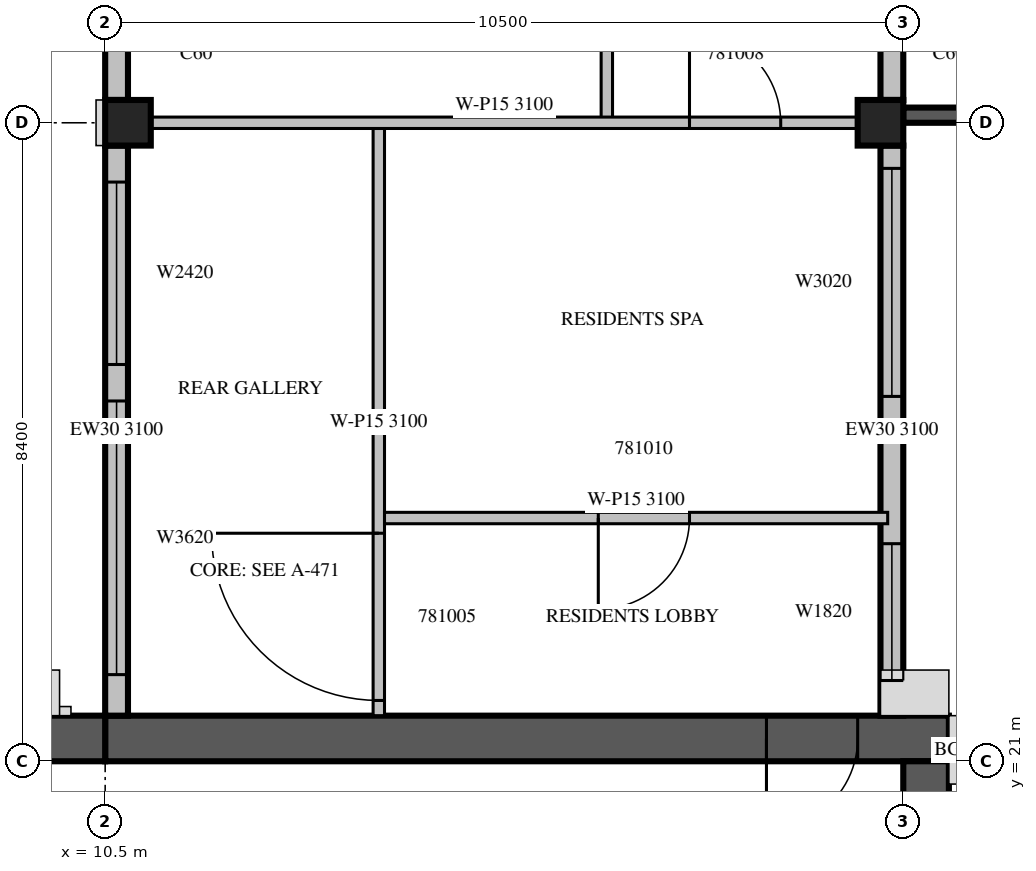
"""IFC4 building model, lengths in metres.
Left out: names, types, materials, properties, quantities, classifications, styles, units other than length and angle.
Written with IfcOpenShell. Run it as: python <this file> out.ifc"""

import sys

from ifc_helpers import new_model, si_unit, direction, frame, frame_2d, origin, origin_2d, place, context, subcontext, project, spatial, rectangle, extrude, source, transform, mapped, element, fill, save


model = new_model("IFC4")
c1 = context("Model", 3, precision=1e-05, world=origin(), true_north=direction((0.0, 1.0)))
c2 = subcontext(c1, "Body", "Model", "MODEL_VIEW")
j1 = project(units=[si_unit("LENGTHUNIT", "METRE"), si_unit("PLANEANGLEUNIT", "RADIAN")], contexts=[c1])
p1 = place(None, origin())
s1 = spatial("IfcSite", under=j1, at=p1, CompositionType="ELEMENT")
p2 = place(p1, origin())
s2 = spatial("IfcBuilding", under=s1, at=p2, CompositionType="ELEMENT")
p3 = place(p2, frame((0.0, 0.0, 344.0)))
s3 = spatial("IfcBuildingStorey", under=s2, at=p3, CompositionType="ELEMENT", Elevation=344.0)
m1 = source(origin(), c2, "Body", "SweptSolid", [
    extrude(rectangle(XDim=0.6, YDim=0.6, at=origin_2d()), origin(), (0.0, 0.0, 1.0), 3.5),
])
for number, where, z_axis, x_axis in (
    (1, (10.8, 29.4, 0.0), (0.0, 0.0, 1.0), (1.0, 0.0, 0.0)),
    (2, (20.7, 29.4, 0.0), (0.0, 0.0, 1.0), (1.0, 0.0, 0.0)),
):
    element("IfcColumn", number, at=place(p3, frame(where, z_axis=z_axis, x_axis=x_axis)), inside=s3, PredefinedType="COLUMN", context=c2, shape_type="MappedRepresentation", body=[
        mapped(m1, transform((0.0, 0.0, 0.0), scale=1.0)),
    ])
m2 = source(origin(), c2, "Body", "SweptSolid", [
    extrude(rectangle(XDim=11.1, YDim=0.6, at=frame_2d((5.55, 0.0))), origin(), (0.0, 0.0, 1.0), 3.5),
])
p4 = place(p3, frame((10.5, 21.3, 0.0), z_axis=(0.0, 0.0, 1.0), x_axis=(1.0, 0.0, 0.0)))
e3 = element("IfcWall", 3, at=p4, inside=s3, PredefinedType="SHEAR", context=c2, shape_type="MappedRepresentation", body=[
    mapped(m2, transform((0.0, 0.0, 0.0), scale=1.0)),
])
m3 = source(origin(), c2, "Body", "SweptSolid", [
    extrude(rectangle(XDim=1.2, YDim=2.1, at=frame_2d((0.6, 1.05))), frame((0.0, 0.31, 0.0), z_axis=(0.0, -1.0, 0.0), x_axis=(1.0, 0.0, 0.0)), (0.0, 0.0, 1.0), 0.62),
])
p5 = place(p4, frame((8.7, 0.0, 0.0)))
e4 = element("IfcOpeningElement", 4, at=p5, cuts=e3, PredefinedType="OPENING", context=c2, shape_type="MappedRepresentation", body=[
    mapped(m3, transform((0.0, 0.0, 0.0), scale=1.0)),
])
m4 = source(origin(), c2, "Body", "SweptSolid", [
    extrude(rectangle(XDim=16.8, YDim=0.6, at=frame_2d((8.4, 0.0))), origin(), (0.0, 0.0, 1.0), 3.5),
])
p6 = place(p3, frame((21.3, 4.2, 0.0), z_axis=(0.0, 0.0, 1.0), x_axis=(0.0, 1.0, 0.0)))
e5 = element("IfcWall", 5, at=p6, inside=s3, PredefinedType="SHEAR", context=c2, shape_type="MappedRepresentation", body=[
    mapped(m4, transform((0.0, 0.0, 0.0), scale=1.0)),
])
m5 = source(origin(), c2, "Body", "SweptSolid", [
    extrude(rectangle(XDim=1.2, YDim=2.4, at=frame_2d((0.6, 1.2))), frame((0.0, 0.31, 0.0), z_axis=(0.0, -1.0, 0.0), x_axis=(1.0, 0.0, 0.0)), (0.0, 0.0, 1.0), 0.62),
])
p7 = place(p6, frame((12.0, 0.0, 0.6)))
e6 = element("IfcOpeningElement", 6, at=p7, cuts=e5, PredefinedType="OPENING", context=c2, shape_type="MappedRepresentation", body=[
    mapped(m5, transform((0.0, 0.0, 0.0), scale=1.0)),
])
m6 = source(origin(), c2, "Body", "SweptSolid", [
    extrude(rectangle(XDim=6.6, YDim=0.6, at=frame_2d((3.3, 0.0))), origin(), (0.0, 0.0, 1.0), 3.5),
])
p8 = place(p3, frame((3.9, 21.3, 0.0), z_axis=(0.0, 0.0, 1.0), x_axis=(1.0, 0.0, 0.0)))
e7 = element("IfcWall", 7, at=p8, inside=s3, PredefinedType="SHEAR", context=c2, shape_type="MappedRepresentation", body=[
    mapped(m6, transform((0.0, 0.0, 0.0), scale=1.0)),
])
p9 = place(p8, frame((1.5, 0.0, 0.6)))
e8 = element("IfcOpeningElement", 8, at=p9, cuts=e7, PredefinedType="OPENING", context=c2, shape_type="MappedRepresentation", body=[
    mapped(m5, transform((0.0, 0.0, 0.0), scale=1.0)),
])
p10 = place(p8, frame((3.6, 0.0, 0.6)))
e9 = element("IfcOpeningElement", 9, at=p10, cuts=e7, PredefinedType="OPENING", context=c2, shape_type="MappedRepresentation", body=[
    mapped(m5, transform((0.0, 0.0, 0.0), scale=1.0)),
])
m7 = source(origin(), c2, "Body", "SweptSolid", [
    extrude(rectangle(XDim=3.9, YDim=0.2, at=frame_2d((1.95, 0.0))), origin(), (0.0, 0.0, 1.0), 3.1),
])
p11 = place(p3, frame((21.0, 29.5, 0.0), z_axis=(0.0, 0.0, 1.0), x_axis=(1.0, 0.0, 0.0)))
e10 = element("IfcWall", 10, at=p11, inside=s3, PredefinedType="SOLIDWALL", context=c2, shape_type="MappedRepresentation", body=[
    mapped(m7, transform((0.0, 0.0, 0.0), scale=1.0)),
])
m8 = source(origin(), c2, "Body", "SweptSolid", [
    extrude(rectangle(XDim=2.4, YDim=2.0, at=frame_2d((1.2, 1.0))), frame((0.0, 0.11, 0.0), z_axis=(0.0, -1.0, 0.0), x_axis=(1.0, 0.0, 0.0)), (0.0, 0.0, 1.0), 0.22),
])
p12 = place(p11, frame((0.75, 0.0, 0.6)))
e11 = element("IfcOpeningElement", 11, at=p12, cuts=e10, PredefinedType="OPENING", context=c2, shape_type="MappedRepresentation", body=[
    mapped(m8, transform((0.0, 0.0, 0.0), scale=1.0)),
])
m9 = source(origin(), c2, "Body", "SweptSolid", [
    extrude(rectangle(XDim=7.5, YDim=0.3, at=frame_2d((3.75, 0.0))), origin(), (0.0, 0.0, 1.0), 3.1),
])
p13 = place(p3, frame((20.85, 21.6, 0.0), z_axis=(0.0, 0.0, 1.0), x_axis=(0.0, 1.0, 0.0)))
e12 = element("IfcWall", 12, at=p13, inside=s3, PredefinedType="STANDARD", context=c2, shape_type="MappedRepresentation", body=[
    mapped(m9, transform((0.0, 0.0, 0.0), scale=1.0)),
])
m10 = source(origin(), c2, "Body", "SweptSolid", [
    extrude(rectangle(XDim=1.8, YDim=2.0, at=frame_2d((0.9, 1.0))), frame((0.0, 0.16, 0.0), z_axis=(0.0, -1.0, 0.0), x_axis=(1.0, 0.0, 0.0)), (0.0, 0.0, 1.0), 0.32),
])
p14 = place(p13, frame((0.463, 0.0, 0.6)))
e13 = element("IfcOpeningElement", 13, at=p14, cuts=e12, PredefinedType="OPENING", context=c2, shape_type="MappedRepresentation", body=[
    mapped(m10, transform((0.0, 0.0, 0.0), scale=1.0)),
])
m11 = source(origin(), c2, "Body", "SweptSolid", [
    extrude(rectangle(XDim=3.0, YDim=2.0, at=frame_2d((1.5, 1.0))), frame((0.0, 0.16, 0.0), z_axis=(0.0, -1.0, 0.0), x_axis=(1.0, 0.0, 0.0)), (0.0, 0.0, 1.0), 0.32),
])
p15 = place(p13, frame((4.2, 0.0, 0.6)))
e14 = element("IfcOpeningElement", 14, at=p15, cuts=e12, PredefinedType="OPENING", context=c2, shape_type="MappedRepresentation", body=[
    mapped(m11, transform((0.0, 0.0, 0.0), scale=1.0)),
])
m12 = source(origin(), c2, "Body", "SweptSolid", [
    extrude(rectangle(XDim=7.8, YDim=0.3, at=frame_2d((3.9, 0.0))), origin(), (0.0, 0.0, 1.0), 3.1),
])
p16 = place(p3, frame((20.85, 29.7, 0.0), z_axis=(0.0, 0.0, 1.0), x_axis=(0.0, 1.0, 0.0)))
e15 = element("IfcWall", 15, at=p16, inside=s3, PredefinedType="STANDARD", context=c2, shape_type="MappedRepresentation", body=[
    mapped(m12, transform((0.0, 0.0, 0.0), scale=1.0)),
])
m13 = source(origin(), c2, "Body", "SweptSolid", [
    extrude(rectangle(XDim=1.0, YDim=2.1, at=frame_2d((0.5, 1.05))), frame((0.0, 0.16, 0.0), z_axis=(0.0, -1.0, 0.0), x_axis=(1.0, 0.0, 0.0)), (0.0, 0.0, 1.0), 0.32),
])
p17 = place(p16, frame((1.767, 0.0, 0.0)))
e16 = element("IfcOpeningElement", 16, at=p17, cuts=e15, PredefinedType="OPENING", context=c2, shape_type="MappedRepresentation", body=[
    mapped(m13, transform((0.0, 0.0, 0.0), scale=1.0)),
])
m14 = source(origin(), c2, "Body", "SweptSolid", [
    extrude(rectangle(XDim=7.8, YDim=0.3, at=frame_2d((3.9, 0.0))), origin(), (0.0, 0.0, 1.0), 2.6),
])
p18 = place(p3, frame((10.65, 37.5, 0.0), z_axis=(0.0, 0.0, 1.0), x_axis=(0.0, -1.0, 0.0)))
e17 = element("IfcWall", 17, at=p18, inside=s3, PredefinedType="STANDARD", context=c2, shape_type="MappedRepresentation", body=[
    mapped(m14, transform((0.0, 0.0, 0.0), scale=1.0)),
])
m15 = source(origin(), c2, "Body", "SweptSolid", [
    extrude(rectangle(XDim=1.2, YDim=2.0, at=frame_2d((0.6, 1.0))), frame((0.0, 0.16, 0.0), z_axis=(0.0, -1.0, 0.0), x_axis=(1.0, 0.0, 0.0)), (0.0, 0.0, 1.0), 0.32),
])
p19 = place(p18, frame((4.348, 0.0, 0.6)))
e18 = element("IfcOpeningElement", 18, at=p19, cuts=e17, PredefinedType="OPENING", context=c2, shape_type="MappedRepresentation", body=[
    mapped(m15, transform((0.0, 0.0, 0.0), scale=1.0)),
])
m16 = source(origin(), c2, "Body", "SweptSolid", [
    extrude(rectangle(XDim=2.4, YDim=2.0, at=frame_2d((1.2, 1.0))), frame((0.0, 0.16, 0.0), z_axis=(0.0, -1.0, 0.0), x_axis=(1.0, 0.0, 0.0)), (0.0, 0.0, 1.0), 0.32),
])
p20 = place(p18, frame((0.974, 0.0, 0.6)))
e19 = element("IfcOpeningElement", 19, at=p20, cuts=e17, PredefinedType="OPENING", context=c2, shape_type="MappedRepresentation", body=[
    mapped(m16, transform((0.0, 0.0, 0.0), scale=1.0)),
])
p21 = place(p3, frame((10.65, 29.1, 0.0), z_axis=(0.0, 0.0, 1.0), x_axis=(0.0, -1.0, 0.0)))
e20 = element("IfcWall", 20, at=p21, inside=s3, PredefinedType="STANDARD", context=c2, shape_type="MappedRepresentation", body=[
    mapped(m9, transform((0.0, 0.0, 0.0), scale=1.0)),
])
m17 = source(origin(), c2, "Body", "SweptSolid", [
    extrude(rectangle(XDim=3.6, YDim=2.0, at=frame_2d((1.8, 1.0))), frame((0.0, 0.16, 0.0), z_axis=(0.0, -1.0, 0.0), x_axis=(1.0, 0.0, 0.0)), (0.0, 0.0, 1.0), 0.32),
])
p22 = place(p21, frame((3.36, 0.0, 0.6)))
e21 = element("IfcOpeningElement", 21, at=p22, cuts=e20, PredefinedType="OPENING", context=c2, shape_type="MappedRepresentation", body=[
    mapped(m17, transform((0.0, 0.0, 0.0), scale=1.0)),
])
p23 = place(p21, frame((0.48, 0.0, 0.6)))
e22 = element("IfcOpeningElement", 22, at=p23, cuts=e20, PredefinedType="OPENING", context=c2, shape_type="MappedRepresentation", body=[
    mapped(m16, transform((0.0, 0.0, 0.0), scale=1.0)),
])
m18 = source(origin(), c2, "Body", "SweptSolid", [
    extrude(rectangle(XDim=7.725, YDim=0.15, at=frame_2d((3.862, 0.0))), origin(), (0.0, 0.0, 1.0), 3.1),
])
p24 = place(p3, frame((14.1, 29.325, 0.0), z_axis=(0.0, 0.0, 1.0), x_axis=(0.0, -1.0, 0.0)))
e23 = element("IfcWall", 23, at=p24, inside=s3, PredefinedType="PARTITIONING", context=c2, shape_type="MappedRepresentation", body=[
    mapped(m18, transform((0.0, 0.0, 0.0), scale=1.0)),
])
m19 = source(origin(), c2, "Body", "SweptSolid", [
    extrude(rectangle(XDim=2.2, YDim=2.1, at=frame_2d((1.1, 1.05))), frame((0.0, 0.085, 0.0), z_axis=(0.0, -1.0, 0.0), x_axis=(1.0, 0.0, 0.0)), (0.0, 0.0, 1.0), 0.17),
])
p25 = place(p24, frame((5.325, 0.0, 0.0)))
e24 = element("IfcOpeningElement", 24, at=p25, cuts=e23, PredefinedType="OPENING", context=c2, shape_type="MappedRepresentation", body=[
    mapped(m19, transform((0.0, 0.0, 0.0), scale=1.0)),
])
m20 = source(origin(), c2, "Body", "SweptSolid", [
    extrude(rectangle(XDim=6.62, YDim=0.15, at=frame_2d((3.31, 0.0))), origin(), (0.0, 0.0, 1.0), 3.1),
])
p26 = place(p3, frame((14.175, 24.2, 0.0), z_axis=(0.0, 0.0, 1.0), x_axis=(1.0, 0.0, 0.0)))
e25 = element("IfcWall", 25, at=p26, inside=s3, PredefinedType="PARTITIONING", context=c2, shape_type="MappedRepresentation", body=[
    mapped(m20, transform((0.0, 0.0, 0.0), scale=1.0)),
])
m21 = source(origin(), c2, "Body", "SweptSolid", [
    extrude(rectangle(XDim=1.2, YDim=2.1, at=frame_2d((0.6, 1.05))), frame((0.0, 0.085, 0.0), z_axis=(0.0, -1.0, 0.0), x_axis=(1.0, 0.0, 0.0)), (0.0, 0.0, 1.0), 0.17),
])
p27 = place(p26, frame((2.812, 0.0, 0.0)))
e26 = element("IfcOpeningElement", 26, at=p27, cuts=e25, PredefinedType="OPENING", context=c2, shape_type="MappedRepresentation", body=[
    mapped(m21, transform((0.0, 0.0, 0.0), scale=1.0)),
])
m22 = source(origin(), c2, "Body", "SweptSolid", [
    extrude(rectangle(XDim=4.2, YDim=0.15, at=frame_2d((2.1, 0.0))), origin(), (0.0, 0.0, 1.0), 2.6),
])
p28 = place(p3, frame((17.1, 33.6, 0.0), z_axis=(0.0, 0.0, 1.0), x_axis=(0.0, -1.0, 0.0)))
e27 = element("IfcWall", 27, at=p28, inside=s3, PredefinedType="PARTITIONING", context=c2, shape_type="MappedRepresentation", body=[
    mapped(m22, transform((0.0, 0.0, 0.0), scale=1.0)),
])
m23 = source(origin(), c2, "Body", "SweptSolid", [
    extrude(rectangle(XDim=1.0, YDim=2.1, at=frame_2d((0.5, 1.05))), frame((0.0, 0.085, 0.0), z_axis=(0.0, -1.0, 0.0), x_axis=(1.0, 0.0, 0.0)), (0.0, 0.0, 1.0), 0.17),
])
p29 = place(p28, frame((1.6, 0.0, 0.0)))
e28 = element("IfcOpeningElement", 28, at=p29, cuts=e27, PredefinedType="OPENING", context=c2, shape_type="MappedRepresentation", body=[
    mapped(m23, transform((0.0, 0.0, 0.0), scale=1.0)),
])
m24 = source(origin(), c2, "Body", "SweptSolid", [
    extrude(rectangle(XDim=9.302, YDim=0.15, at=frame_2d((4.651, 0.0))), origin(), (0.0, 0.0, 1.0), 3.1),
])
p30 = place(p3, frame((11.099, 29.4, 0.0), z_axis=(0.0, 0.0, 1.0), x_axis=(1.0, 0.0, 0.0)))
e29 = element("IfcWall", 29, at=p30, inside=s3, PredefinedType="PARTITIONING", context=c2, shape_type="MappedRepresentation", body=[
    mapped(m24, transform((0.0, 0.0, 0.0), scale=1.0)),
])
p31 = place(p30, frame((7.088, 0.0, 0.0)))
e30 = element("IfcOpeningElement", 30, at=p31, cuts=e29, PredefinedType="OPENING", context=c2, shape_type="MappedRepresentation", body=[
    mapped(m21, transform((0.0, 0.0, 0.0), scale=1.0)),
])
m25 = source(origin(), c2, "Body", "SweptSolid", [
    extrude(rectangle(XDim=1.8, YDim=2.0, at=frame_2d((0.9, 1.0))), frame((0.0, 0.03, 0.0), z_axis=(0.0, -1.0, 0.0), x_axis=(1.0, 0.0, 0.0)), (0.0, 0.0, 1.0), 0.06),
])
p32 = place(p14, origin())
e31 = element("IfcWindow", 31, at=p32, inside=s3, PartitioningType="SINGLE_PANEL", PredefinedType="WINDOW", context=c2, shape_type="MappedRepresentation", body=[
    mapped(m25, transform((0.0, 0.0, 0.0), scale=1.0)),
])
fill(e13, e31)
m26 = source(origin(), c2, "Body", "SweptSolid", [
    extrude(rectangle(XDim=3.0, YDim=2.0, at=frame_2d((1.5, 1.0))), frame((0.0, 0.03, 0.0), z_axis=(0.0, -1.0, 0.0), x_axis=(1.0, 0.0, 0.0)), (0.0, 0.0, 1.0), 0.06),
])
p33 = place(p15, origin())
e32 = element("IfcWindow", 32, at=p33, inside=s3, PartitioningType="SINGLE_PANEL", PredefinedType="WINDOW", context=c2, shape_type="MappedRepresentation", body=[
    mapped(m26, transform((0.0, 0.0, 0.0), scale=1.0)),
])
fill(e14, e32)
m27 = source(origin(), c2, "Body", "SweptSolid", [
    extrude(rectangle(XDim=3.6, YDim=2.0, at=frame_2d((1.8, 1.0))), frame((0.0, 0.03, 0.0), z_axis=(0.0, -1.0, 0.0), x_axis=(1.0, 0.0, 0.0)), (0.0, 0.0, 1.0), 0.06),
])
p34 = place(p22, origin())
e33 = element("IfcWindow", 33, at=p34, inside=s3, PartitioningType="SINGLE_PANEL", PredefinedType="WINDOW", context=c2, shape_type="MappedRepresentation", body=[
    mapped(m27, transform((0.0, 0.0, 0.0), scale=1.0)),
])
fill(e21, e33)
m28 = source(origin(), c2, "Body", "SweptSolid", [
    extrude(rectangle(XDim=2.4, YDim=2.0, at=frame_2d((1.2, 1.0))), frame((0.0, 0.03, 0.0), z_axis=(0.0, -1.0, 0.0), x_axis=(1.0, 0.0, 0.0)), (0.0, 0.0, 1.0), 0.06),
])
p35 = place(p23, origin())
e34 = element("IfcWindow", 34, at=p35, inside=s3, PartitioningType="SINGLE_PANEL", PredefinedType="WINDOW", context=c2, shape_type="MappedRepresentation", body=[
    mapped(m28, transform((0.0, 0.0, 0.0), scale=1.0)),
])
fill(e22, e34)
m29 = source(origin(), c2, "Body", "SweptSolid", [
    extrude(rectangle(XDim=1.2, YDim=2.1, at=frame_2d((0.6, 1.05))), frame((0.0, 0.025, 0.0), z_axis=(0.0, -1.0, 0.0), x_axis=(1.0, 0.0, 0.0)), (0.0, 0.0, 1.0), 0.05),
])
p36 = place(p5, origin())
e35 = element("IfcDoor", 35, at=p36, inside=s3, OperationType="SINGLE_SWING_RIGHT", PredefinedType="DOOR", context=c2, shape_type="MappedRepresentation", body=[
    mapped(m29, transform((0.0, 0.0, 0.0), scale=1.0)),
])
fill(e4, e35)
m30 = source(origin(), c2, "Body", "SweptSolid", [
    extrude(rectangle(XDim=2.2, YDim=2.1, at=frame_2d((1.1, 1.05))), frame((0.0, 0.025, 0.0), z_axis=(0.0, -1.0, 0.0), x_axis=(1.0, 0.0, 0.0)), (0.0, 0.0, 1.0), 0.05),
])
p37 = place(p25, origin())
e36 = element("IfcDoor", 36, at=p37, inside=s3, OperationType="DOUBLE_DOOR_SINGLE_SWING", PredefinedType="DOOR", context=c2, shape_type="MappedRepresentation", body=[
    mapped(m30, transform((0.0, 0.0, 0.0), scale=1.0)),
])
fill(e24, e36)
p38 = place(p31, origin())
e37 = element("IfcDoor", 37, at=p38, inside=s3, OperationType="SINGLE_SWING_LEFT", PredefinedType="DOOR", context=c2, shape_type="MappedRepresentation", body=[
    mapped(m29, transform((0.0, 0.0, 0.0), scale=1.0)),
])
fill(e30, e37)
p39 = place(p27, origin())
e38 = element("IfcDoor", 38, at=p39, inside=s3, OperationType="SINGLE_SWING_RIGHT", PredefinedType="DOOR", context=c2, shape_type="MappedRepresentation", body=[
    mapped(m29, transform((0.0, 0.0, 0.0), scale=1.0)),
])
fill(e26, e38)
save(model, sys.argv[1])
